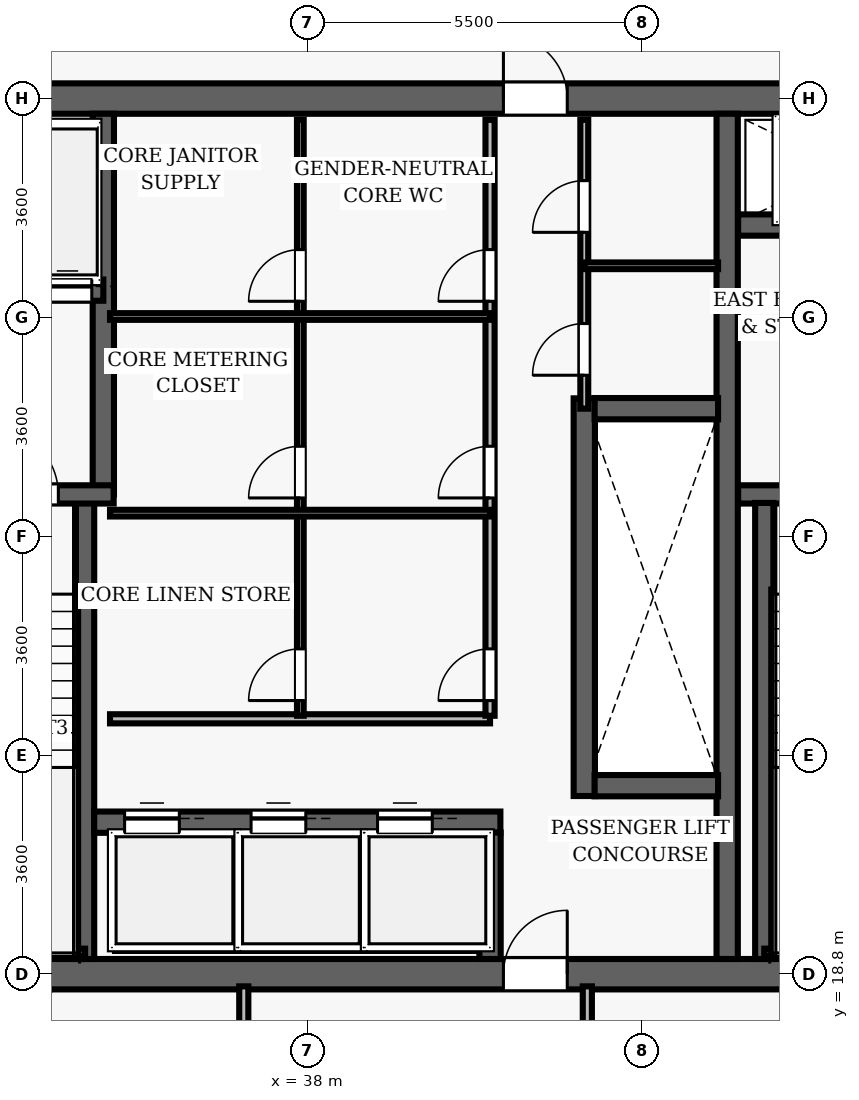
"""IFC4 building model, lengths in metres.
Left out: names, types, materials, properties, quantities, classifications, styles, units other than length and angle.
Written with IfcOpenShell. Run it as: python <this file> out.ifc"""

import sys

from ifc_helpers import new_model, si_unit, direction, frame, frame_2d, origin, place, context, subcontext, project, spatial, rectangle, extrude, element, fill, save


model = new_model("IFC4")
c1 = context("Model", 3, precision=1e-05, world=origin(), true_north=direction((0.0, 1.0)))
c2 = subcontext(c1, "Body", "Model", "MODEL_VIEW")
j1 = project(units=[si_unit("LENGTHUNIT", "METRE"), si_unit("PLANEANGLEUNIT", "RADIAN")], contexts=[c1])
p1 = place(None, origin())
s1 = spatial("IfcSite", under=j1, at=p1, CompositionType="ELEMENT")
p2 = place(p1, origin())
s2 = spatial("IfcBuilding", under=s1, at=p2, CompositionType="ELEMENT")
p3 = place(p2, frame((0.0, 0.0, 178.9)))
s3 = spatial("IfcBuildingStorey", under=s2, at=p3, CompositionType="ELEMENT", Elevation=178.9)
p4 = place(p3, frame((26.75, 18.8, 0.0), z_axis=(0.0, 0.0, 1.0), x_axis=(1.0, 0.0, 0.0)))
e1 = element("IfcWall", 1, at=p4, inside=s3, PredefinedType="SHEAR", context=c2, shape_type="SweptSolid", body=[
    extrude(rectangle(XDim=22.5, YDim=0.5, at=frame_2d((11.25, 0.0))), origin(), (0.0, 0.0, 1.0), 3.85),
])
p5 = place(p4, frame((14.47, 0.0, 0.0)))
e2 = element("IfcOpeningElement", 2, at=p5, cuts=e1, PredefinedType="OPENING", context=c2, shape_type="SweptSolid", body=[
    extrude(rectangle(XDim=1.05, YDim=2.15, at=frame_2d((0.525, 1.075))), frame((0.0, 0.26, 0.0), z_axis=(0.0, -1.0, 0.0), x_axis=(1.0, 0.0, 0.0)), (0.0, 0.0, 1.0), 0.52),
])
p6 = place(p3, frame((26.75, 33.2, 0.0), z_axis=(0.0, 0.0, 1.0), x_axis=(1.0, 0.0, 0.0)))
e3 = element("IfcWall", 3, at=p6, inside=s3, PredefinedType="SHEAR", context=c2, shape_type="SweptSolid", body=[
    extrude(rectangle(XDim=22.5, YDim=0.5, at=frame_2d((11.25, 0.0))), origin(), (0.0, 0.0, 1.0), 3.85),
])
p7 = place(p6, frame((4.57, 0.0, 0.0)))
e4 = element("IfcOpeningElement", 4, at=p7, cuts=e3, PredefinedType="OPENING", context=c2, shape_type="SweptSolid", body=[
    extrude(rectangle(XDim=1.05, YDim=2.15, at=frame_2d((0.525, 1.075))), frame((0.0, 0.26, 0.0), z_axis=(0.0, -1.0, 0.0), x_axis=(1.0, 0.0, 0.0)), (0.0, 0.0, 1.0), 0.52),
])
p8 = place(p6, frame((14.47, 0.0, 0.0)))
e5 = element("IfcOpeningElement", 5, at=p8, cuts=e3, PredefinedType="OPENING", context=c2, shape_type="SweptSolid", body=[
    extrude(rectangle(XDim=1.05, YDim=2.15, at=frame_2d((0.525, 1.075))), frame((0.0, 0.26, 0.0), z_axis=(0.0, -1.0, 0.0), x_axis=(1.0, 0.0, 0.0)), (0.0, 0.0, 1.0), 0.52),
])
p9 = place(p3, frame((44.9, 19.05, 0.0), z_axis=(0.0, 0.0, 1.0), x_axis=(0.0, 1.0, 0.0)))
e6 = element("IfcWall", 6, at=p9, inside=s3, PredefinedType="SHEAR", context=c2, shape_type="SweptSolid", body=[
    extrude(rectangle(XDim=13.9, YDim=0.35, at=frame_2d((6.95, 0.0))), origin(), (0.0, 0.0, 1.0), 3.85),
])
p10 = place(p3, frame((45.08, 26.69, 0.0), z_axis=(0.0, 0.0, 1.0), x_axis=(1.0, 0.0, 0.0)))
e7 = element("IfcWall", 7, at=p10, inside=s3, PredefinedType="SHEAR", context=c2, shape_type="SweptSolid", body=[
    extrude(rectangle(XDim=3.67, YDim=0.3, at=frame_2d((1.835, 0.0))), origin(), (0.0, 0.0, 1.0), 3.85),
])
p11 = place(p10, frame((1.05, 0.0, 0.0)))
e8 = element("IfcOpeningElement", 8, at=p11, cuts=e7, PredefinedType="OPENING", context=c2, shape_type="SweptSolid", body=[
    extrude(rectangle(XDim=1.1, YDim=2.15, at=frame_2d((0.55, 1.075))), frame((0.0, 0.16, 0.0), z_axis=(0.0, -1.0, 0.0), x_axis=(1.0, 0.0, 0.0)), (0.0, 0.0, 1.0), 0.32),
])
p12 = place(p3, frame((45.51, 19.05, 0.0), z_axis=(0.0, 0.0, 1.0), x_axis=(0.0, 1.0, 0.0)))
e9 = element("IfcWall", 9, at=p12, inside=s3, PredefinedType="SHEAR", context=c2, shape_type="SweptSolid", body=[
    extrude(rectangle(XDim=7.5, YDim=0.3, at=frame_2d((3.75, 0.0))), origin(), (0.0, 0.0, 1.0), 3.85),
])
p13 = place(p3, frame((45.51, 19.16, 0.0), z_axis=(0.0, 0.0, 1.0), x_axis=(1.0, 0.0, 0.0)))
e10 = element("IfcWall", 10, at=p13, inside=s3, PredefinedType="SHEAR", context=c2, shape_type="SweptSolid", body=[
    extrude(rectangle(XDim=3.095, YDim=0.12, at=frame_2d((1.547, 0.0))), origin(), (0.0, 0.0, 1.0), 3.85),
])
p14 = place(p3, frame((45.08, 31.12, 0.0), z_axis=(0.0, 0.0, 1.0), x_axis=(1.0, 0.0, 0.0)))
e11 = element("IfcWall", 11, at=p14, inside=s3, PredefinedType="SHEAR", context=c2, shape_type="SweptSolid", body=[
    extrude(rectangle(XDim=3.67, YDim=0.35, at=frame_2d((1.835, 0.0))), origin(), (0.0, 0.0, 1.0), 3.035),
])
p15 = place(p14, frame((1.25, 0.0, 0.0)))
e12 = element("IfcOpeningElement", 12, at=p15, cuts=e11, PredefinedType="OPENING", context=c2, shape_type="SweptSolid", body=[
    extrude(rectangle(XDim=1.1, YDim=2.15, at=frame_2d((0.55, 1.075))), frame((0.0, 0.185, 0.0), z_axis=(0.0, -1.0, 0.0), x_axis=(1.0, 0.0, 0.0)), (0.0, 0.0, 1.0), 0.37),
])
p16 = place(p3, frame((34.34, 19.05, 0.0), z_axis=(0.0, 0.0, 1.0), x_axis=(0.0, 1.0, 0.0)))
e13 = element("IfcWall", 13, at=p16, inside=s3, PredefinedType="SHEAR", context=c2, shape_type="SweptSolid", body=[
    extrude(rectangle(XDim=7.5, YDim=0.3, at=frame_2d((3.75, 0.0))), origin(), (0.0, 0.0, 1.0), 3.85),
])
p17 = place(p3, frame((34.64, 26.69, 0.0), z_axis=(0.0, 0.0, 1.0), x_axis=(0.0, 1.0, 0.0)))
e14 = element("IfcWall", 14, at=p17, inside=s3, PredefinedType="SHEAR", context=c2, shape_type="SweptSolid", body=[
    extrude(rectangle(XDim=6.26, YDim=0.35, at=frame_2d((3.13, 0.0))), origin(), (0.0, 0.0, 1.0), 3.85),
])
p18 = place(p3, frame((31.25, 26.69, 0.0), z_axis=(0.0, 0.0, 1.0), x_axis=(1.0, 0.0, 0.0)))
e15 = element("IfcWall", 15, at=p18, inside=s3, PredefinedType="SHEAR", context=c2, shape_type="SweptSolid", body=[
    extrude(rectangle(XDim=3.56, YDim=0.3, at=frame_2d((1.78, 0.0))), origin(), (0.0, 0.0, 1.0), 3.85),
])
p19 = place(p18, frame((1.55, 0.0, 0.0)))
e16 = element("IfcOpeningElement", 16, at=p19, cuts=e15, PredefinedType="OPENING", context=c2, shape_type="SweptSolid", body=[
    extrude(rectangle(XDim=1.1, YDim=2.15, at=frame_2d((0.55, 1.075))), frame((0.0, 0.16, 0.0), z_axis=(0.0, -1.0, 0.0), x_axis=(1.0, 0.0, 0.0)), (0.0, 0.0, 1.0), 0.32),
])
p20 = place(p3, frame((31.3, 19.16, 0.0), z_axis=(0.0, 0.0, 1.0), x_axis=(1.0, 0.0, 0.0)))
e17 = element("IfcWall", 17, at=p20, inside=s3, PredefinedType="SHEAR", context=c2, shape_type="SweptSolid", body=[
    extrude(rectangle(XDim=3.04, YDim=0.12, at=frame_2d((1.52, 0.0))), origin(), (0.0, 0.0, 1.0), 3.85),
])
p21 = place(p3, frame((32.23, 30.05, 0.0), z_axis=(0.0, 0.0, 1.0), x_axis=(1.0, 0.0, 0.0)))
e18 = element("IfcWall", 18, at=p21, inside=s3, PredefinedType="SHEAR", context=c2, shape_type="SweptSolid", body=[
    extrude(rectangle(XDim=2.41, YDim=0.35, at=frame_2d((1.205, 0.0))), origin(), (0.0, 0.0, 1.0), 3.035),
])
p22 = place(p21, frame((0.42, 0.0, 0.0)))
e19 = element("IfcOpeningElement", 19, at=p22, cuts=e18, PredefinedType="OPENING", context=c2, shape_type="SweptSolid", body=[
    extrude(rectangle(XDim=0.8, YDim=2.15, at=frame_2d((0.4, 1.075))), frame((0.0, 0.185, 0.0), z_axis=(0.0, -1.0, 0.0), x_axis=(1.0, 0.0, 0.0)), (0.0, 0.0, 1.0), 0.37),
])
p23 = place(p21, frame((1.42, 0.0, 0.0)))
e20 = element("IfcOpeningElement", 20, at=p23, cuts=e18, PredefinedType="OPENING", context=c2, shape_type="SweptSolid", body=[
    extrude(rectangle(XDim=0.8, YDim=2.15, at=frame_2d((0.4, 1.075))), frame((0.0, 0.185, 0.0), z_axis=(0.0, -1.0, 0.0), x_axis=(1.0, 0.0, 0.0)), (0.0, 0.0, 1.0), 0.37),
])
p24 = place(p3, frame((42.55, 21.73, 0.0), z_axis=(0.0, 0.0, 1.0), x_axis=(0.0, 1.0, 0.0)))
e21 = element("IfcWall", 21, at=p24, inside=s3, PredefinedType="SHEAR", context=c2, shape_type="SweptSolid", body=[
    extrude(rectangle(XDim=6.54, YDim=0.35, at=frame_2d((3.27, 0.0))), origin(), (0.0, 0.0, 1.0), 3.035),
])
for number, where, z_axis, x_axis in (
    (22, (42.72, 21.9, 0.0), (0.0, 0.0, 1.0), (1.0, 0.0, 0.0)),
    (23, (42.72, 28.1, 0.0), (0.0, 0.0, 1.0), (1.0, 0.0, 0.0)),
):
    element("IfcWall", number, at=place(p3, frame(where, z_axis=z_axis, x_axis=x_axis)), inside=s3, PredefinedType="SHEAR", context=c2, shape_type="SweptSolid", body=[
        extrude(rectangle(XDim=2.03, YDim=0.35, at=frame_2d((1.015, 0.0))), origin(), (0.0, 0.0, 1.0), 3.035),
    ])
p25 = place(p3, frame((34.49, 21.3, 0.0), z_axis=(0.0, 0.0, 1.0), x_axis=(1.0, 0.0, 0.0)))
e24 = element("IfcWall", 24, at=p25, inside=s3, PredefinedType="SHEAR", context=c2, shape_type="SweptSolid", body=[
    extrude(rectangle(XDim=6.68, YDim=0.35, at=frame_2d((3.34, 0.0))), origin(), (0.0, 0.0, 1.0), 3.035),
])
p26 = place(p25, frame((0.5, 0.0, 0.0)))
e25 = element("IfcOpeningElement", 25, at=p26, cuts=e24, PredefinedType="OPENING", context=c2, shape_type="SweptSolid", body=[
    extrude(rectangle(XDim=0.9, YDim=2.15, at=frame_2d((0.45, 1.075))), frame((0.0, 0.185, 0.0), z_axis=(0.0, -1.0, 0.0), x_axis=(1.0, 0.0, 0.0)), (0.0, 0.0, 1.0), 0.37),
])
p27 = place(p25, frame((2.58, 0.0, 0.0)))
e26 = element("IfcOpeningElement", 26, at=p27, cuts=e24, PredefinedType="OPENING", context=c2, shape_type="SweptSolid", body=[
    extrude(rectangle(XDim=0.9, YDim=2.15, at=frame_2d((0.45, 1.075))), frame((0.0, 0.185, 0.0), z_axis=(0.0, -1.0, 0.0), x_axis=(1.0, 0.0, 0.0)), (0.0, 0.0, 1.0), 0.37),
])
p28 = place(p25, frame((4.66, 0.0, 0.0)))
e27 = element("IfcOpeningElement", 27, at=p28, cuts=e24, PredefinedType="OPENING", context=c2, shape_type="SweptSolid", body=[
    extrude(rectangle(XDim=0.9, YDim=2.15, at=frame_2d((0.45, 1.075))), frame((0.0, 0.185, 0.0), z_axis=(0.0, -1.0, 0.0), x_axis=(1.0, 0.0, 0.0)), (0.0, 0.0, 1.0), 0.37),
])
p29 = place(p3, frame((41.0, 19.05, 0.0), z_axis=(0.0, 0.0, 1.0), x_axis=(0.0, 1.0, 0.0)))
e28 = element("IfcWall", 28, at=p29, inside=s3, PredefinedType="SHEAR", context=c2, shape_type="SweptSolid", body=[
    extrude(rectangle(XDim=2.08, YDim=0.35, at=frame_2d((1.04, 0.0))), origin(), (0.0, 0.0, 1.0), 3.035),
])
p30 = place(p3, frame((34.75, 23.0, 0.0), z_axis=(0.0, 0.0, 1.0), x_axis=(1.0, 0.0, 0.0)))
e29 = element("IfcWall", 29, at=p30, inside=s3, PredefinedType="PARTITIONING", context=c2, shape_type="SweptSolid", body=[
    extrude(rectangle(XDim=6.25, YDim=0.15, at=frame_2d((3.125, 0.0))), origin(), (0.0, 0.0, 1.0), 3.035),
])
p31 = place(p3, frame((41.0, 23.05, 0.0), z_axis=(0.0, 0.0, 1.0), x_axis=(0.0, 1.0, 0.0)))
e30 = element("IfcWall", 30, at=p31, inside=s3, PredefinedType="PARTITIONING", context=c2, shape_type="SweptSolid", body=[
    extrude(rectangle(XDim=9.8, YDim=0.15, at=frame_2d((4.9, 0.0))), origin(), (0.0, 0.0, 1.0), 3.035),
])
p32 = place(p31, frame((0.25, 0.0, 0.0)))
e31 = element("IfcOpeningElement", 31, at=p32, cuts=e30, PredefinedType="OPENING", context=c2, shape_type="SweptSolid", body=[
    extrude(rectangle(XDim=0.85, YDim=2.1, at=frame_2d((0.425, 1.05))), frame((0.0, 0.085, 0.0), z_axis=(0.0, -1.0, 0.0), x_axis=(1.0, 0.0, 0.0)), (0.0, 0.0, 1.0), 0.17),
])
p33 = place(p31, frame((3.582, 0.0, 0.0)))
e32 = element("IfcOpeningElement", 32, at=p33, cuts=e30, PredefinedType="OPENING", context=c2, shape_type="SweptSolid", body=[
    extrude(rectangle(XDim=0.85, YDim=2.1, at=frame_2d((0.425, 1.05))), frame((0.0, 0.085, 0.0), z_axis=(0.0, -1.0, 0.0), x_axis=(1.0, 0.0, 0.0)), (0.0, 0.0, 1.0), 0.17),
])
p34 = place(p31, frame((6.816, 0.0, 0.0)))
e33 = element("IfcOpeningElement", 33, at=p34, cuts=e30, PredefinedType="OPENING", context=c2, shape_type="SweptSolid", body=[
    extrude(rectangle(XDim=0.85, YDim=2.1, at=frame_2d((0.425, 1.05))), frame((0.0, 0.085, 0.0), z_axis=(0.0, -1.0, 0.0), x_axis=(1.0, 0.0, 0.0)), (0.0, 0.0, 1.0), 0.17),
])
p35 = place(p3, frame((37.88, 23.05, 0.0), z_axis=(0.0, 0.0, 1.0), x_axis=(0.0, 1.0, 0.0)))
e34 = element("IfcWall", 34, at=p35, inside=s3, PredefinedType="PARTITIONING", context=c2, shape_type="SweptSolid", body=[
    extrude(rectangle(XDim=9.8, YDim=0.11, at=frame_2d((4.9, 0.0))), origin(), (0.0, 0.0, 1.0), 3.035),
])
p36 = place(p35, frame((0.25, 0.0, 0.0)))
e35 = element("IfcOpeningElement", 35, at=p36, cuts=e34, PredefinedType="OPENING", context=c2, shape_type="SweptSolid", body=[
    extrude(rectangle(XDim=0.85, YDim=2.1, at=frame_2d((0.425, 1.05))), frame((0.0, 0.065, 0.0), z_axis=(0.0, -1.0, 0.0), x_axis=(1.0, 0.0, 0.0)), (0.0, 0.0, 1.0), 0.13),
])
p37 = place(p35, frame((3.582, 0.0, 0.0)))
e36 = element("IfcOpeningElement", 36, at=p37, cuts=e34, PredefinedType="OPENING", context=c2, shape_type="SweptSolid", body=[
    extrude(rectangle(XDim=0.85, YDim=2.1, at=frame_2d((0.425, 1.05))), frame((0.0, 0.065, 0.0), z_axis=(0.0, -1.0, 0.0), x_axis=(1.0, 0.0, 0.0)), (0.0, 0.0, 1.0), 0.13),
])
p38 = place(p35, frame((6.816, 0.0, 0.0)))
e37 = element("IfcOpeningElement", 37, at=p38, cuts=e34, PredefinedType="OPENING", context=c2, shape_type="SweptSolid", body=[
    extrude(rectangle(XDim=0.85, YDim=2.1, at=frame_2d((0.425, 1.05))), frame((0.0, 0.065, 0.0), z_axis=(0.0, -1.0, 0.0), x_axis=(1.0, 0.0, 0.0)), (0.0, 0.0, 1.0), 0.13),
])
for number, where, z_axis, x_axis in (
    (38, (34.75, 26.382, 0.0), (0.0, 0.0, 1.0), (1.0, 0.0, 0.0)),
    (39, (34.75, 29.616, 0.0), (0.0, 0.0, 1.0), (1.0, 0.0, 0.0)),
):
    element("IfcWall", number, at=place(p3, frame(where, z_axis=z_axis, x_axis=x_axis)), inside=s3, PredefinedType="PARTITIONING", context=c2, shape_type="SweptSolid", body=[
        extrude(rectangle(XDim=6.25, YDim=0.11, at=frame_2d((3.125, 0.0))), origin(), (0.0, 0.0, 1.0), 3.035),
    ])
p39 = place(p3, frame((42.55, 28.1, 0.0), z_axis=(0.0, 0.0, 1.0), x_axis=(0.0, 1.0, 0.0)))
e40 = element("IfcWall", 40, at=p39, inside=s3, PredefinedType="PARTITIONING", context=c2, shape_type="SweptSolid", body=[
    extrude(rectangle(XDim=4.75, YDim=0.13, at=frame_2d((2.375, 0.0))), origin(), (0.0, 0.0, 1.0), 3.035),
])
p40 = place(p39, frame((0.55, 0.0, 0.0)))
e41 = element("IfcOpeningElement", 41, at=p40, cuts=e40, PredefinedType="OPENING", context=c2, shape_type="SweptSolid", body=[
    extrude(rectangle(XDim=0.85, YDim=2.1, at=frame_2d((0.425, 1.05))), frame((0.0, 0.075, 0.0), z_axis=(0.0, -1.0, 0.0), x_axis=(1.0, 0.0, 0.0)), (0.0, 0.0, 1.0), 0.15),
])
p41 = place(p39, frame((2.9, 0.0, 0.0)))
e42 = element("IfcOpeningElement", 42, at=p41, cuts=e40, PredefinedType="OPENING", context=c2, shape_type="SweptSolid", body=[
    extrude(rectangle(XDim=0.85, YDim=2.1, at=frame_2d((0.425, 1.05))), frame((0.0, 0.075, 0.0), z_axis=(0.0, -1.0, 0.0), x_axis=(1.0, 0.0, 0.0)), (0.0, 0.0, 1.0), 0.15),
])
p42 = place(p3, frame((42.55, 30.45, 0.0), z_axis=(0.0, 0.0, 1.0), x_axis=(1.0, 0.0, 0.0)))
e43 = element("IfcWall", 43, at=p42, inside=s3, PredefinedType="PARTITIONING", context=c2, shape_type="SweptSolid", body=[
    extrude(rectangle(XDim=2.2, YDim=0.11, at=frame_2d((1.1, 0.0))), origin(), (0.0, 0.0, 1.0), 3.035),
])
p43 = place(p3, frame((36.95, 11.2, 0.0), z_axis=(0.0, 0.0, 1.0), x_axis=(0.0, 1.0, 0.0)))
e44 = element("IfcWall", 44, at=p43, inside=s3, PredefinedType="PARTITIONING", context=c2, shape_type="SweptSolid", body=[
    extrude(rectangle(XDim=7.4, YDim=0.15, at=frame_2d((3.7, 0.0))), origin(), (0.0, 0.0, 1.0), 3.035),
])
p44 = place(p43, frame((5.075, 0.0, 0.0)))
e45 = element("IfcOpeningElement", 45, at=p44, cuts=e44, PredefinedType="OPENING", context=c2, shape_type="SweptSolid", body=[
    extrude(rectangle(XDim=0.95, YDim=2.15, at=frame_2d((0.475, 1.075))), frame((0.0, 0.085, 0.0), z_axis=(0.0, -1.0, 0.0), x_axis=(1.0, 0.0, 0.0)), (0.0, 0.0, 1.0), 0.17),
])
p45 = place(p3, frame((42.6, 16.65, 0.0), z_axis=(0.0, 0.0, 1.0), x_axis=(0.0, 1.0, 0.0)))
e46 = element("IfcWall", 46, at=p45, inside=s3, PredefinedType="PARTITIONING", context=c2, shape_type="SweptSolid", body=[
    extrude(rectangle(XDim=1.95, YDim=0.15, at=frame_2d((0.975, 0.0))), origin(), (0.0, 0.0, 1.0), 3.035),
])
p46 = place(p19, origin())
e47 = element("IfcDoor", 47, at=p46, inside=s3, OperationType="SINGLE_SWING_LEFT", PredefinedType="DOOR", context=c2, shape_type="SweptSolid", body=[
    extrude(rectangle(XDim=1.1, YDim=2.15, at=frame_2d((0.55, 1.075))), frame((0.0, 0.025, 0.0), z_axis=(0.0, -1.0, 0.0), x_axis=(1.0, 0.0, 0.0)), (0.0, 0.0, 1.0), 0.05),
])
fill(e16, e47)
p47 = place(p8, origin())
e48 = element("IfcDoor", 48, at=p47, inside=s3, OperationType="SINGLE_SWING_LEFT", PredefinedType="DOOR", context=c2, shape_type="SweptSolid", body=[
    extrude(rectangle(XDim=1.05, YDim=2.15, at=frame_2d((0.525, 1.075))), frame((0.0, 0.025, 0.0), z_axis=(0.0, -1.0, 0.0), x_axis=(1.0, 0.0, 0.0)), (0.0, 0.0, 1.0), 0.05),
])
fill(e5, e48)
p48 = place(p5, origin())
e49 = element("IfcDoor", 49, at=p48, inside=s3, OperationType="SINGLE_SWING_RIGHT", PredefinedType="DOOR", context=c2, shape_type="SweptSolid", body=[
    extrude(rectangle(XDim=1.05, YDim=2.15, at=frame_2d((0.525, 1.075))), frame((0.0, 0.025, 0.0), z_axis=(0.0, -1.0, 0.0), x_axis=(1.0, 0.0, 0.0)), (0.0, 0.0, 1.0), 0.05),
])
fill(e2, e49)
p49 = place(p32, origin())
e50 = element("IfcDoor", 50, at=p49, inside=s3, OperationType="SINGLE_SWING_LEFT", PredefinedType="DOOR", context=c2, shape_type="SweptSolid", body=[
    extrude(rectangle(XDim=0.85, YDim=2.1, at=frame_2d((0.425, 1.05))), frame((0.0, 0.025, 0.0), z_axis=(0.0, -1.0, 0.0), x_axis=(1.0, 0.0, 0.0)), (0.0, 0.0, 1.0), 0.05),
])
fill(e31, e50)
p50 = place(p36, origin())
e51 = element("IfcDoor", 51, at=p50, inside=s3, OperationType="SINGLE_SWING_LEFT", PredefinedType="DOOR", context=c2, shape_type="SweptSolid", body=[
    extrude(rectangle(XDim=0.85, YDim=2.1, at=frame_2d((0.425, 1.05))), frame((0.0, 0.025, 0.0), z_axis=(0.0, -1.0, 0.0), x_axis=(1.0, 0.0, 0.0)), (0.0, 0.0, 1.0), 0.05),
])
fill(e35, e51)
p51 = place(p33, origin())
e52 = element("IfcDoor", 52, at=p51, inside=s3, OperationType="SINGLE_SWING_LEFT", PredefinedType="DOOR", context=c2, shape_type="SweptSolid", body=[
    extrude(rectangle(XDim=0.85, YDim=2.1, at=frame_2d((0.425, 1.05))), frame((0.0, 0.025, 0.0), z_axis=(0.0, -1.0, 0.0), x_axis=(1.0, 0.0, 0.0)), (0.0, 0.0, 1.0), 0.05),
])
fill(e32, e52)
p52 = place(p37, origin())
e53 = element("IfcDoor", 53, at=p52, inside=s3, OperationType="SINGLE_SWING_LEFT", PredefinedType="DOOR", context=c2, shape_type="SweptSolid", body=[
    extrude(rectangle(XDim=0.85, YDim=2.1, at=frame_2d((0.425, 1.05))), frame((0.0, 0.025, 0.0), z_axis=(0.0, -1.0, 0.0), x_axis=(1.0, 0.0, 0.0)), (0.0, 0.0, 1.0), 0.05),
])
fill(e36, e53)
p53 = place(p34, origin())
e54 = element("IfcDoor", 54, at=p53, inside=s3, OperationType="SINGLE_SWING_LEFT", PredefinedType="DOOR", context=c2, shape_type="SweptSolid", body=[
    extrude(rectangle(XDim=0.85, YDim=2.1, at=frame_2d((0.425, 1.05))), frame((0.0, 0.025, 0.0), z_axis=(0.0, -1.0, 0.0), x_axis=(1.0, 0.0, 0.0)), (0.0, 0.0, 1.0), 0.05),
])
fill(e33, e54)
p54 = place(p38, origin())
e55 = element("IfcDoor", 55, at=p54, inside=s3, OperationType="SINGLE_SWING_LEFT", PredefinedType="DOOR", context=c2, shape_type="SweptSolid", body=[
    extrude(rectangle(XDim=0.85, YDim=2.1, at=frame_2d((0.425, 1.05))), frame((0.0, 0.025, 0.0), z_axis=(0.0, -1.0, 0.0), x_axis=(1.0, 0.0, 0.0)), (0.0, 0.0, 1.0), 0.05),
])
fill(e37, e55)
p55 = place(p40, origin())
e56 = element("IfcDoor", 56, at=p55, inside=s3, OperationType="SINGLE_SWING_LEFT", PredefinedType="DOOR", context=c2, shape_type="SweptSolid", body=[
    extrude(rectangle(XDim=0.85, YDim=2.1, at=frame_2d((0.425, 1.05))), frame((0.0, 0.025, 0.0), z_axis=(0.0, -1.0, 0.0), x_axis=(1.0, 0.0, 0.0)), (0.0, 0.0, 1.0), 0.05),
])
fill(e41, e56)
p56 = place(p41, origin())
e57 = element("IfcDoor", 57, at=p56, inside=s3, OperationType="SINGLE_SWING_LEFT", PredefinedType="DOOR", context=c2, shape_type="SweptSolid", body=[
    extrude(rectangle(XDim=0.85, YDim=2.1, at=frame_2d((0.425, 1.05))), frame((0.0, 0.025, 0.0), z_axis=(0.0, -1.0, 0.0), x_axis=(1.0, 0.0, 0.0)), (0.0, 0.0, 1.0), 0.05),
])
fill(e42, e57)
p57 = place(p26, origin())
e58 = element("IfcDoor", 58, at=p57, inside=s3, OperationType="SLIDING_TO_LEFT", PredefinedType="DOOR", context=c2, shape_type="SweptSolid", body=[
    extrude(rectangle(XDim=0.9, YDim=2.15, at=frame_2d((0.45, 1.075))), frame((0.0, 0.025, 0.0), z_axis=(0.0, -1.0, 0.0), x_axis=(1.0, 0.0, 0.0)), (0.0, 0.0, 1.0), 0.05),
])
fill(e25, e58)
p58 = place(p27, origin())
e59 = element("IfcDoor", 59, at=p58, inside=s3, OperationType="SLIDING_TO_LEFT", PredefinedType="DOOR", context=c2, shape_type="SweptSolid", body=[
    extrude(rectangle(XDim=0.9, YDim=2.15, at=frame_2d((0.45, 1.075))), frame((0.0, 0.025, 0.0), z_axis=(0.0, -1.0, 0.0), x_axis=(1.0, 0.0, 0.0)), (0.0, 0.0, 1.0), 0.05),
])
fill(e26, e59)
p59 = place(p28, origin())
e60 = element("IfcDoor", 60, at=p59, inside=s3, OperationType="SLIDING_TO_LEFT", PredefinedType="DOOR", context=c2, shape_type="SweptSolid", body=[
    extrude(rectangle(XDim=0.9, YDim=2.15, at=frame_2d((0.45, 1.075))), frame((0.0, 0.025, 0.0), z_axis=(0.0, -1.0, 0.0), x_axis=(1.0, 0.0, 0.0)), (0.0, 0.0, 1.0), 0.05),
])
fill(e27, e60)
p60 = place(p23, origin())
e61 = element("IfcDoor", 61, at=p60, inside=s3, OperationType="SLIDING_TO_LEFT", PredefinedType="DOOR", context=c2, shape_type="SweptSolid", body=[
    extrude(rectangle(XDim=0.8, YDim=2.15, at=frame_2d((0.4, 1.075))), frame((0.0, 0.025, 0.0), z_axis=(0.0, -1.0, 0.0), x_axis=(1.0, 0.0, 0.0)), (0.0, 0.0, 1.0), 0.05),
])
fill(e20, e61)
save(model, sys.argv[1])
